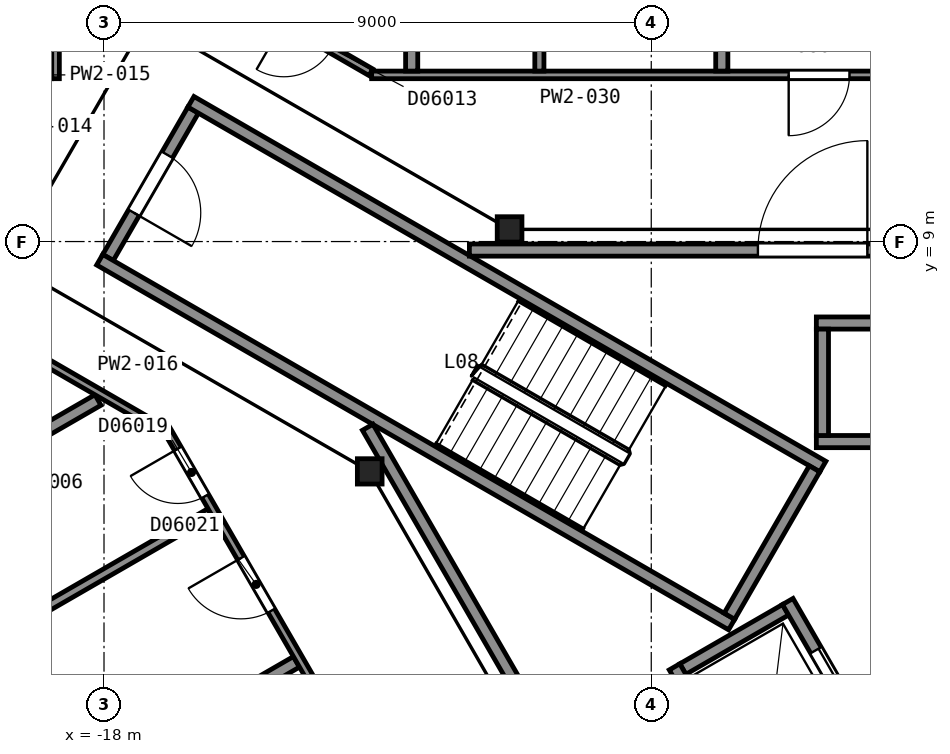
"""IFC4 building model, lengths in metres.
Left out: names, types, materials, properties, quantities, classifications, styles, units other than length and angle.
Written with IfcOpenShell. Run it as: python <this file> out.ifc"""

import sys

from ifc_helpers import new_model, si_unit, direction, frame, frame_2d, origin, origin_2d, place, context, subcontext, project, spatial, rectangle, i_section, extrude, element, fill, save


model = new_model("IFC4")
c1 = context("Model", 3, precision=1e-05, world=origin(), true_north=direction((0.0, 1.0)))
c2 = subcontext(c1, "Body", "Model", "MODEL_VIEW")
j1 = project(units=[si_unit("LENGTHUNIT", "METRE"), si_unit("PLANEANGLEUNIT", "RADIAN")], contexts=[c1])
p1 = place(None, origin())
s1 = spatial("IfcSite", under=j1, at=p1, CompositionType="ELEMENT")
p2 = place(p1, origin())
s2 = spatial("IfcBuilding", under=s1, at=p2, CompositionType="ELEMENT")
p3 = place(p2, frame((0.0, 0.0, 44.0)))
s3 = spatial("IfcBuildingStorey", under=s2, at=p3, CompositionType="ELEMENT", Elevation=44.0)
for number, where, z_axis, x_axis in (
    (1, (-11.33, 9.2, 0.0), (0.0, 0.0, 1.0), (1.0, 0.0, 0.0)),
    (2, (-13.63, 5.22, 0.0), (0.0, 0.0, 1.0), (1.0, 0.0, 0.0)),
):
    element("IfcColumn", number, at=place(p3, frame(where, z_axis=z_axis, x_axis=x_axis)), inside=s3, PredefinedType="COLUMN", context=c2, shape_type="SweptSolid", body=[
        extrude(i_section(OverallWidth=0.406, OverallDepth=0.417, WebThickness=0.03, FlangeThickness=0.048, FilletRadius=0.015, at=origin_2d()), origin(), (0.0, 0.0, 1.0), 3.6),
    ])
p4 = place(p3, frame((-16.534, 11.162, 0.0), z_axis=(0.0, 0.0, 1.0), x_axis=(-0.49998411664, -0.866034573852, 0.0)))
e3 = element("IfcWall", 3, at=p4, inside=s3, PredefinedType="PARTITIONING", context=c2, shape_type="SweptSolid", body=[
    extrude(rectangle(XDim=2.8, YDim=0.2, at=frame_2d((1.4, 0.0))), origin(), (0.0, 0.0, 1.0), 3.35),
])
p5 = place(p4, frame((0.85, 0.0, 0.0)))
e4 = element("IfcOpeningElement", 4, at=p5, cuts=e3, PredefinedType="OPENING", context=c2, shape_type="SweptSolid", body=[
    extrude(rectangle(XDim=1.1, YDim=2.1, at=frame_2d((0.55, 1.05))), frame((0.0, 0.11, 0.0), z_axis=(0.0, -1.0, 0.0), x_axis=(1.0, 0.0, 0.0)), (0.0, 0.0, 1.0), 0.22),
])
for number, where, z_axis, x_axis in (
    (5, (-7.678, 2.701, 0.0), (0.0, 0.0, 1.0), (-0.866, 0.5, 0.0)),
    (6, (-6.178, 5.299, 0.0), (0.0, 0.0, 1.0), (-0.866, 0.5, 0.0)),
):
    element("IfcWall", number, at=place(p3, frame(where, z_axis=z_axis, x_axis=x_axis)), inside=s3, PredefinedType="PARTITIONING", context=c2, shape_type="SweptSolid", body=[
        extrude(rectangle(XDim=12.0, YDim=0.2, at=frame_2d((6.0, 0.0))), origin(), (0.0, 0.0, 1.0), 3.35),
    ])
p6 = place(p3, frame((-6.315, 5.262, 0.0), z_axis=(0.0, 0.0, 1.0), x_axis=(-0.500049511043, -0.865996816683, 0.0)))
e7 = element("IfcWall", 7, at=p6, inside=s3, PredefinedType="PARTITIONING", context=c2, shape_type="SweptSolid", body=[
    extrude(rectangle(XDim=2.8, YDim=0.2, at=frame_2d((1.4, 0.0))), origin(), (0.0, 0.0, 1.0), 3.35),
])
for number, where, z_axis, x_axis in (
    (8, (-6.285, 5.71, 0.0), (0.0, 0.0, 1.0), (1.0, 0.0, 0.0)),
    (9, (-6.285, 7.66, 0.0), (0.0, 0.0, 1.0), (1.0, 0.0, 0.0)),
):
    element("IfcWall", number, at=place(p3, frame(where, z_axis=z_axis, x_axis=x_axis)), inside=s3, PredefinedType="PARTITIONING", context=c2, shape_type="SweptSolid", body=[
        extrude(rectangle(XDim=2.35, YDim=0.2, at=frame_2d((1.175, 0.0))), origin(), (0.0, 0.0, 1.0), 3.6),
    ])
p7 = place(p3, frame((-8.48, 1.969, 0.0), z_axis=(0.0, 0.0, 1.0), x_axis=(0.866000020948, 0.500043961785, 0.0)))
e10 = element("IfcWall", 10, at=p7, inside=s3, PredefinedType="PARTITIONING", context=c2, shape_type="SweptSolid", body=[
    extrude(rectangle(XDim=1.95, YDim=0.2, at=frame_2d((0.975, 0.0))), origin(), (0.0, 0.0, 1.0), 3.6),
])
p8 = place(p3, frame((-6.185, 5.81, 0.0), z_axis=(0.0, 0.0, 1.0), x_axis=(0.0, 1.0, 0.0)))
e11 = element("IfcWall", 11, at=p8, inside=s3, PredefinedType="PARTITIONING", context=c2, shape_type="SweptSolid", body=[
    extrude(rectangle(XDim=1.75, YDim=0.2, at=frame_2d((0.875, 0.0))), origin(), (0.0, 0.0, 1.0), 3.6),
])
p9 = place(p3, frame((-5.28, 0.525, 0.0), z_axis=(0.0, 0.0, 1.0), x_axis=(-0.500037662692, 0.866003658127, 0.0)))
e12 = element("IfcWall", 12, at=p9, inside=s3, PredefinedType="PARTITIONING", context=c2, shape_type="SweptSolid", body=[
    extrude(rectangle(XDim=2.95, YDim=0.2, at=frame_2d((1.475, 0.0))), origin(), (0.0, 0.0, 1.0), 3.6),
])
p10 = place(p9, frame((0.925, 0.0, 0.0)))
e13 = element("IfcOpeningElement", 13, at=p10, cuts=e12, PredefinedType="OPENING", context=c2, shape_type="SweptSolid", body=[
    extrude(rectangle(XDim=1.1, YDim=2.1, at=frame_2d((0.55, 1.05))), frame((0.0, 0.11, 0.0), z_axis=(0.0, -1.0, 0.0), x_axis=(1.0, 0.0, 0.0)), (0.0, 0.0, 1.0), 0.22),
])
p11 = place(p3, frame((-7.242, -0.376, 0.0), z_axis=(0.0, 0.0, 1.0), x_axis=(-0.499996545922, 0.866027397988, 0.0)))
e14 = element("IfcWall", 14, at=p11, inside=s3, PredefinedType="PARTITIONING", context=c2, shape_type="SweptSolid", body=[
    extrude(rectangle(XDim=2.75, YDim=0.2, at=frame_2d((1.375, 0.0))), origin(), (0.0, 0.0, 1.0), 3.6),
])
p12 = place(p3, frame((-13.664, 5.946, 0.0), z_axis=(0.0, 0.0, 1.0), x_axis=(0.499994327219, -0.866028678941, 0.0)))
e15 = element("IfcWall", 15, at=p12, inside=s3, PredefinedType="PARTITIONING", context=c2, shape_type="SweptSolid", body=[
    extrude(rectangle(XDim=23.968, YDim=0.2, at=frame_2d((11.984, 0.0))), origin(), (0.0, 0.0, 1.0), 3.35),
])
p13 = place(p3, frame((0.263, 8.86, 0.0), z_axis=(0.0, 0.0, 1.0), x_axis=(-1.0, 0.0, 0.0)))
e16 = element("IfcWall", 16, at=p13, inside=s3, PredefinedType="PARTITIONING", context=c2, shape_type="SweptSolid", body=[
    extrude(rectangle(XDim=12.254, YDim=0.2, at=frame_2d((6.127, 0.0))), origin(), (0.0, 0.0, 1.0), 3.35),
])
p14 = place(p13, frame((5.709, 0.0, 0.0)))
e17 = element("IfcOpeningElement", 17, at=p14, cuts=e16, PredefinedType="OPENING", context=c2, shape_type="SweptSolid", body=[
    extrude(rectangle(XDim=1.8, YDim=2.1, at=frame_2d((0.9, 1.05))), frame((0.0, 0.11, 0.0), z_axis=(0.0, -1.0, 0.0), x_axis=(1.0, 0.0, 0.0)), (0.0, 0.0, 1.0), 0.22),
])
p15 = place(p3, frame((-23.693, 0.247, 0.0), z_axis=(0.0, 0.0, 1.0), x_axis=(0.866031705461, 0.499989085017, 0.0)))
e18 = element("IfcWall", 18, at=p15, inside=s3, PredefinedType="PARTITIONING", context=c2, shape_type="SweptSolid", body=[
    extrude(rectangle(XDim=8.587, YDim=0.15, at=frame_2d((4.293, 0.0))), origin(), (0.0, 0.0, 1.0), 2.613),
])
p16 = place(p3, frame((-21.312, 4.54, 0.0), z_axis=(0.0, 0.0, 1.0), x_axis=(0.866071583234, 0.499920006315, 0.0)))
e19 = element("IfcWall", 19, at=p16, inside=s3, PredefinedType="PARTITIONING", context=c2, shape_type="SweptSolid", body=[
    extrude(rectangle(XDim=3.708, YDim=0.2, at=frame_2d((1.854, 0.0))), origin(), (0.0, 0.0, 1.0), 2.613),
])
p17 = place(p3, frame((-19.26, 7.194, 0.0), z_axis=(0.0, 0.0, 1.0), x_axis=(0.865944638795, -0.50013986298, 0.0)))
e20 = element("IfcWall", 20, at=p17, inside=s3, PredefinedType="PARTITIONING", context=c2, shape_type="SweptSolid", body=[
    extrude(rectangle(XDim=2.599, YDim=0.125, at=frame_2d((1.299, 0.0))), origin(), (0.0, 0.0, 1.0), 2.613),
])
p18 = place(p3, frame((-18.797, 11.678, 0.0), z_axis=(0.0, 0.0, 1.0), x_axis=(0.0, 1.0, 0.0)))
e21 = element("IfcWall", 21, at=p18, inside=s3, PredefinedType="PARTITIONING", context=c2, shape_type="SweptSolid", body=[
    extrude(rectangle(XDim=2.394, YDim=0.125, at=frame_2d((1.197, 0.0))), origin(), (0.0, 0.0, 1.0), 2.613),
])
p19 = place(p18, frame((0.562, 0.0, 0.0)))
e22 = element("IfcOpeningElement", 22, at=p19, cuts=e21, PredefinedType="OPENING", context=c2, shape_type="SweptSolid", body=[
    extrude(rectangle(XDim=0.9, YDim=2.1, at=frame_2d((0.45, 1.05))), frame((0.0, 0.073, 0.0), z_axis=(0.0, -1.0, 0.0), x_axis=(1.0, 0.0, 0.0)), (0.0, 0.0, 1.0), 0.145),
])
p20 = place(p3, frame((-17.725, 0.419, 0.0), z_axis=(0.0, 0.0, 1.0), x_axis=(0.865960142641, 0.500113018585, 0.0)))
e23 = element("IfcWall", 23, at=p20, inside=s3, PredefinedType="PARTITIONING", context=c2, shape_type="SweptSolid", body=[
    extrude(rectangle(XDim=3.337, YDim=0.2, at=frame_2d((1.668, 0.0))), origin(), (0.0, 0.0, 1.0), 2.613),
])
p21 = place(p3, frame((-3.766, -16.958, 0.0), z_axis=(0.0, 0.0, 1.0), x_axis=(-0.500024758804, 0.866011108811, 0.0)))
e24 = element("IfcWall", 24, at=p21, inside=s3, PredefinedType="PARTITIONING", context=c2, shape_type="SweptSolid", body=[
    extrude(rectangle(XDim=26.402, YDim=0.125, at=frame_2d((13.201, 0.0))), origin(), (0.0, 0.0, 1.0), 2.613),
])
p22 = place(p21, frame((25.139, 0.0, 0.0)))
e25 = element("IfcOpeningElement", 25, at=p22, cuts=e24, PredefinedType="OPENING", context=c2, shape_type="SweptSolid", body=[
    extrude(rectangle(XDim=0.9, YDim=2.1, at=frame_2d((0.45, 1.05))), frame((0.0, 0.073, 0.0), z_axis=(0.0, -1.0, 0.0), x_axis=(1.0, 0.0, 0.0)), (0.0, 0.0, 1.0), 0.145),
])
p23 = place(p21, frame((22.963, 0.0, 0.0)))
e26 = element("IfcOpeningElement", 26, at=p23, cuts=e24, PredefinedType="OPENING", context=c2, shape_type="SweptSolid", body=[
    extrude(rectangle(XDim=1.0, YDim=2.1, at=frame_2d((0.5, 1.05))), frame((0.0, 0.073, 0.0), z_axis=(0.0, -1.0, 0.0), x_axis=(1.0, 0.0, 0.0)), (0.0, 0.0, 1.0), 0.145),
])
p24 = place(p21, frame((15.228, 0.0, 0.0)))
e27 = element("IfcOpeningElement", 27, at=p24, cuts=e24, PredefinedType="OPENING", context=c2, shape_type="SweptSolid", body=[
    extrude(rectangle(XDim=0.9, YDim=2.1, at=frame_2d((0.45, 1.05))), frame((0.0, 0.073, 0.0), z_axis=(0.0, -1.0, 0.0), x_axis=(1.0, 0.0, 0.0)), (0.0, 0.0, 1.0), 0.145),
])
p25 = place(p21, frame((12.702, 0.0, 0.0)))
e28 = element("IfcOpeningElement", 28, at=p25, cuts=e24, PredefinedType="OPENING", context=c2, shape_type="SweptSolid", body=[
    extrude(rectangle(XDim=0.9, YDim=2.1, at=frame_2d((0.45, 1.05))), frame((0.0, 0.073, 0.0), z_axis=(0.0, -1.0, 0.0), x_axis=(1.0, 0.0, 0.0)), (0.0, 0.0, 1.0), 0.145),
])
p26 = place(p21, frame((5.624, 0.0, 0.0)))
e29 = element("IfcOpeningElement", 29, at=p26, cuts=e24, PredefinedType="OPENING", context=c2, shape_type="SweptSolid", body=[
    extrude(rectangle(XDim=0.9, YDim=2.1, at=frame_2d((0.45, 1.05))), frame((0.0, 0.073, 0.0), z_axis=(0.0, -1.0, 0.0), x_axis=(1.0, 0.0, 0.0)), (0.0, 0.0, 1.0), 0.145),
])
p27 = place(p21, frame((2.843, 0.0, 0.0)))
e30 = element("IfcOpeningElement", 30, at=p27, cuts=e24, PredefinedType="OPENING", context=c2, shape_type="SweptSolid", body=[
    extrude(rectangle(XDim=0.9, YDim=2.1, at=frame_2d((0.45, 1.05))), frame((0.0, 0.073, 0.0), z_axis=(0.0, -1.0, 0.0), x_axis=(1.0, 0.0, 0.0)), (0.0, 0.0, 1.0), 0.145),
])
p28 = place(p3, frame((-15.778, 13.035, 0.0), z_axis=(0.0, 0.0, 1.0), x_axis=(0.866110899347, -0.499851888094, 0.0)))
e31 = element("IfcWall", 31, at=p28, inside=s3, PredefinedType="PARTITIONING", context=c2, shape_type="SweptSolid", body=[
    extrude(rectangle(XDim=2.504, YDim=0.125, at=frame_2d((1.252, 0.0))), origin(), (0.0, 0.0, 1.0), 2.613),
])
p29 = place(p28, frame((0.85, 0.0, 0.0)))
e32 = element("IfcOpeningElement", 32, at=p29, cuts=e31, PredefinedType="OPENING", context=c2, shape_type="SweptSolid", body=[
    extrude(rectangle(XDim=0.9, YDim=2.1, at=frame_2d((0.45, 1.05))), frame((0.0, 0.073, 0.0), z_axis=(0.0, -1.0, 0.0), x_axis=(1.0, 0.0, 0.0)), (0.0, 0.0, 1.0), 0.145),
])
p30 = place(p3, frame((-13.598, 11.741, 0.0), z_axis=(0.0, 0.0, 1.0), x_axis=(1.0, 0.0, 0.0)))
e33 = element("IfcWall", 33, at=p30, inside=s3, PredefinedType="PARTITIONING", context=c2, shape_type="SweptSolid", body=[
    extrude(rectangle(XDim=27.197, YDim=0.125, at=frame_2d((13.598, 0.0))), origin(), (0.0, 0.0, 1.0), 2.613),
])
p31 = place(p30, frame((20.107, 0.0, 0.0)))
e34 = element("IfcOpeningElement", 34, at=p31, cuts=e33, PredefinedType="OPENING", context=c2, shape_type="SweptSolid", body=[
    extrude(rectangle(XDim=0.9, YDim=2.1, at=frame_2d((0.45, 1.05))), frame((0.0, 0.073, 0.0), z_axis=(0.0, -1.0, 0.0), x_axis=(1.0, 0.0, 0.0)), (0.0, 0.0, 1.0), 0.145),
])
p32 = place(p30, frame((16.97, 0.0, 0.0)))
e35 = element("IfcOpeningElement", 35, at=p32, cuts=e33, PredefinedType="OPENING", context=c2, shape_type="SweptSolid", body=[
    extrude(rectangle(XDim=0.9, YDim=2.1, at=frame_2d((0.45, 1.05))), frame((0.0, 0.073, 0.0), z_axis=(0.0, -1.0, 0.0), x_axis=(1.0, 0.0, 0.0)), (0.0, 0.0, 1.0), 0.145),
])
p33 = place(p30, frame((9.934, 0.0, 0.0)))
e36 = element("IfcOpeningElement", 36, at=p33, cuts=e33, PredefinedType="OPENING", context=c2, shape_type="SweptSolid", body=[
    extrude(rectangle(XDim=0.9, YDim=2.1, at=frame_2d((0.45, 1.05))), frame((0.0, 0.073, 0.0), z_axis=(0.0, -1.0, 0.0), x_axis=(1.0, 0.0, 0.0)), (0.0, 0.0, 1.0), 0.145),
])
p34 = place(p30, frame((6.858, 0.0, 0.0)))
e37 = element("IfcOpeningElement", 37, at=p34, cuts=e33, PredefinedType="OPENING", context=c2, shape_type="SweptSolid", body=[
    extrude(rectangle(XDim=1.0, YDim=2.1, at=frame_2d((0.5, 1.05))), frame((0.0, 0.073, 0.0), z_axis=(0.0, -1.0, 0.0), x_axis=(1.0, 0.0, 0.0)), (0.0, 0.0, 1.0), 0.145),
])
p35 = place(p3, frame((-12.94, 11.803, 0.0), z_axis=(0.0, 0.0, 1.0), x_axis=(0.0, 1.0, 0.0)))
e38 = element("IfcWall", 38, at=p35, inside=s3, PredefinedType="PARTITIONING", context=c2, shape_type="SweptSolid", body=[
    extrude(rectangle(XDim=2.812, YDim=0.2, at=frame_2d((1.406, 0.0))), origin(), (0.0, 0.0, 1.0), 2.613),
])
p36 = place(p3, frame((-10.84, 11.803, 0.0), z_axis=(0.0, 0.0, 1.0), x_axis=(0.0, 1.0, 0.0)))
e39 = element("IfcWall", 39, at=p36, inside=s3, PredefinedType="PARTITIONING", context=c2, shape_type="SweptSolid", body=[
    extrude(rectangle(XDim=8.592, YDim=0.15, at=frame_2d((4.296, 0.0))), origin(), (0.0, 0.0, 1.0), 2.613),
])
p37 = place(p3, frame((-7.84, 11.803, 0.0), z_axis=(0.0, 0.0, 1.0), x_axis=(0.0, 1.0, 0.0)))
e40 = element("IfcWall", 40, at=p37, inside=s3, PredefinedType="PARTITIONING", context=c2, shape_type="SweptSolid", body=[
    extrude(rectangle(XDim=3.338, YDim=0.2, at=frame_2d((1.669, 0.0))), origin(), (0.0, 0.0, 1.0), 2.613),
])
p38 = place(p5, origin())
e41 = element("IfcDoor", 41, at=p38, inside=s3, OperationType="SINGLE_SWING_RIGHT", PredefinedType="DOOR", context=c2, shape_type="SweptSolid", body=[
    extrude(rectangle(XDim=1.1, YDim=2.1, at=frame_2d((0.55, 1.05))), frame((0.0, 0.025, 0.0), z_axis=(0.0, -1.0, 0.0), x_axis=(1.0, 0.0, 0.0)), (0.0, 0.0, 1.0), 0.05),
])
fill(e4, e41)
p39 = place(p10, origin())
e42 = element("IfcDoor", 42, at=p39, inside=s3, OperationType="SLIDING_TO_LEFT", PredefinedType="DOOR", context=c2, shape_type="SweptSolid", body=[
    extrude(rectangle(XDim=1.1, YDim=2.1, at=frame_2d((0.55, 1.05))), frame((0.0, 0.025, 0.0), z_axis=(0.0, -1.0, 0.0), x_axis=(1.0, 0.0, 0.0)), (0.0, 0.0, 1.0), 0.05),
])
fill(e13, e42)
p40 = place(p14, origin())
e43 = element("IfcDoor", 43, at=p40, inside=s3, OperationType="DOUBLE_DOOR_SINGLE_SWING", PredefinedType="DOOR", context=c2, shape_type="SweptSolid", body=[
    extrude(rectangle(XDim=1.8, YDim=2.1, at=frame_2d((0.9, 1.05))), frame((0.0, 0.025, 0.0), z_axis=(0.0, -1.0, 0.0), x_axis=(1.0, 0.0, 0.0)), (0.0, 0.0, 1.0), 0.05),
])
fill(e17, e43)
p41 = place(p22, origin())
e44 = element("IfcDoor", 44, at=p41, inside=s3, OperationType="SINGLE_SWING_RIGHT", PredefinedType="DOOR", context=c2, shape_type="SweptSolid", body=[
    extrude(rectangle(XDim=0.9, YDim=2.1, at=frame_2d((0.45, 1.05))), frame((0.0, 0.025, 0.0), z_axis=(0.0, -1.0, 0.0), x_axis=(1.0, 0.0, 0.0)), (0.0, 0.0, 1.0), 0.05),
])
fill(e25, e44)
p42 = place(p23, origin())
e45 = element("IfcDoor", 45, at=p42, inside=s3, OperationType="SINGLE_SWING_RIGHT", PredefinedType="DOOR", context=c2, shape_type="SweptSolid", body=[
    extrude(rectangle(XDim=1.0, YDim=2.1, at=frame_2d((0.5, 1.05))), frame((0.0, 0.025, 0.0), z_axis=(0.0, -1.0, 0.0), x_axis=(1.0, 0.0, 0.0)), (0.0, 0.0, 1.0), 0.05),
])
fill(e26, e45)
p43 = place(p34, origin())
e46 = element("IfcDoor", 46, at=p43, inside=s3, OperationType="SINGLE_SWING_LEFT", PredefinedType="DOOR", context=c2, shape_type="SweptSolid", body=[
    extrude(rectangle(XDim=1.0, YDim=2.1, at=frame_2d((0.5, 1.05))), frame((0.0, 0.025, 0.0), z_axis=(0.0, -1.0, 0.0), x_axis=(1.0, 0.0, 0.0)), (0.0, 0.0, 1.0), 0.05),
])
fill(e37, e46)
save(model, sys.argv[1])
